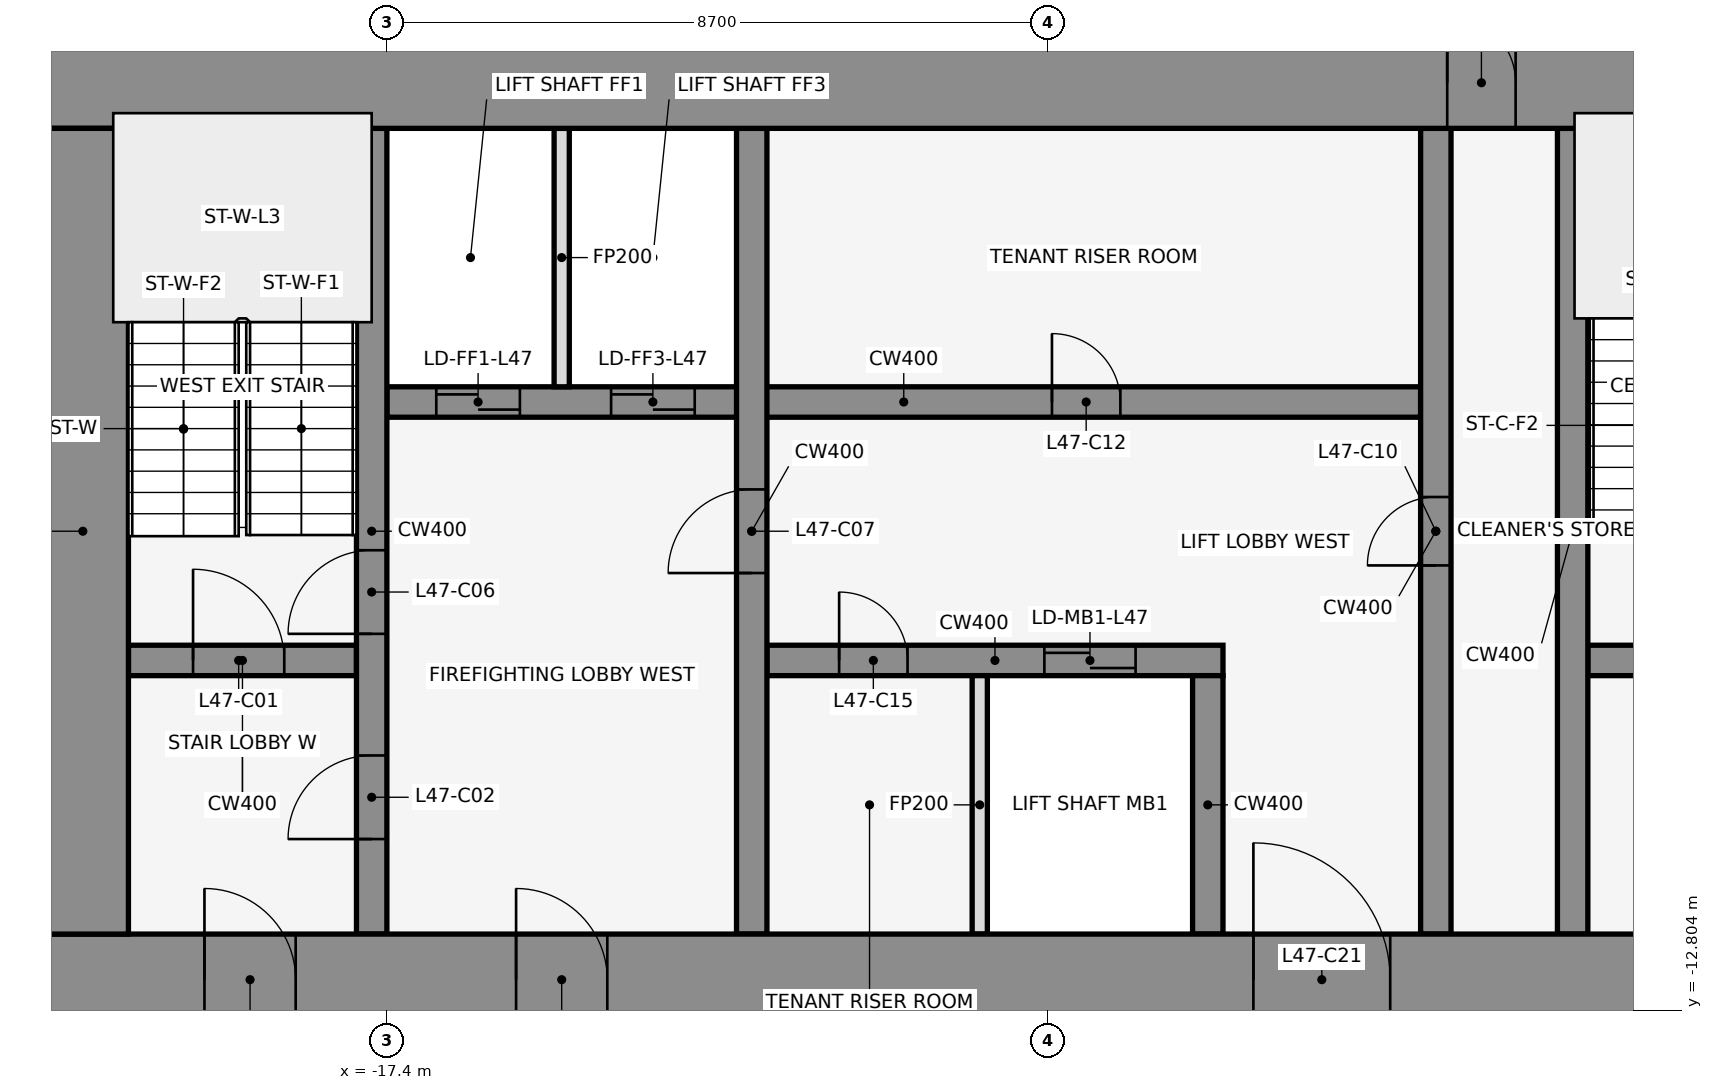
"""IFC4 building model, lengths in metres.
Left out: names, types, materials, properties, quantities, classifications, styles, units other than length and angle.
Written with IfcOpenShell. Run it as: python <this file> out.ifc"""

import sys

from ifc_helpers import new_model, si_unit, direction, frame, frame_2d, origin, place, context, subcontext, project, spatial, rectangle, extrude, element, fill, save


model = new_model("IFC4")
c1 = context("Model", 3, precision=1e-05, world=origin(), true_north=direction((0.0, 1.0)))
c2 = subcontext(c1, "Body", "Model", "MODEL_VIEW")
j1 = project(units=[si_unit("LENGTHUNIT", "METRE"), si_unit("PLANEANGLEUNIT", "RADIAN")], contexts=[c1])
p1 = place(None, origin())
s1 = spatial("IfcSite", under=j1, at=p1, CompositionType="ELEMENT")
p2 = place(p1, origin())
s2 = spatial("IfcBuilding", under=s1, at=p2, CompositionType="ELEMENT")
p3 = place(p2, frame((0.0, 0.0, 211.4)))
s3 = spatial("IfcBuildingStorey", under=s2, at=p3, CompositionType="ELEMENT", Elevation=211.4)
for number, where, z_axis, x_axis in (
    (1, (-0.068, -0.105, 0.0), (0.0, 0.0, 1.0), (-0.84, 0.543, 0.0)),
    (2, (-14.599, 1.08, 0.0), (0.0, 0.0, 1.0), (-0.84, -0.543, 0.0)),
):
    element("IfcWall", number, at=place(p3, frame(where, z_axis=z_axis, x_axis=x_axis)), inside=s3, PredefinedType="STANDARD", context=c2, shape_type="SweptSolid", body=[
        extrude(rectangle(XDim=2.183, YDim=0.25, at=frame_2d((1.091, 0.0))), origin(), (0.0, 0.0, 1.0), 3.95),
    ])
p4 = place(p3, frame((-20.8, -8.2, 0.0), z_axis=(0.0, 0.0, 1.0), x_axis=(1.0, 0.0, 0.0)))
e3 = element("IfcWall", 3, at=p4, inside=s3, PredefinedType="SHEAR", context=c2, shape_type="SweptSolid", body=[
    extrude(rectangle(XDim=3.0, YDim=0.4, at=frame_2d((1.5, 0.0))), origin(), (0.0, 0.0, 1.0), 4.1),
])
p5 = place(p4, frame((0.85, 0.0, 0.0)))
e4 = element("IfcOpeningElement", 4, at=p5, cuts=e3, PredefinedType="OPENING", context=c2, shape_type="SweptSolid", body=[
    extrude(rectangle(XDim=1.2, YDim=2.1, at=frame_2d((0.6, 1.05))), frame((0.0, 0.212, 0.0), z_axis=(0.0, -1.0, 0.0), x_axis=(1.0, 0.0, 0.0)), (0.0, 0.0, 1.0), 0.424),
])
p6 = place(p3, frame((-12.4, -8.2, 0.0), z_axis=(0.0, 0.0, 1.0), x_axis=(1.0, 0.0, 0.0)))
e5 = element("IfcWall", 5, at=p6, inside=s3, PredefinedType="SHEAR", context=c2, shape_type="SweptSolid", body=[
    extrude(rectangle(XDim=6.0, YDim=0.4, at=frame_2d((3.0, 0.0))), origin(), (0.0, 0.0, 1.0), 4.1),
])
p7 = place(p6, frame((3.65, 0.0, 0.0)))
e6 = element("IfcOpeningElement", 6, at=p7, cuts=e5, PredefinedType="OPENING", context=c2, shape_type="SweptSolid", body=[
    extrude(rectangle(XDim=1.2, YDim=2.1, at=frame_2d((0.6, 1.05))), frame((0.0, 0.212, 0.0), z_axis=(0.0, -1.0, 0.0), x_axis=(1.0, 0.0, 0.0)), (0.0, 0.0, 1.0), 0.424),
])
p8 = place(p6, frame((0.95, 0.0, 0.0)))
e7 = element("IfcOpeningElement", 7, at=p8, cuts=e5, PredefinedType="OPENING", context=c2, shape_type="SweptSolid", body=[
    extrude(rectangle(XDim=0.9, YDim=2.1, at=frame_2d((0.45, 1.05))), frame((0.0, 0.212, 0.0), z_axis=(0.0, -1.0, 0.0), x_axis=(1.0, 0.0, 0.0)), (0.0, 0.0, 1.0), 0.424),
])
p9 = place(p3, frame((-1.6, -8.2, 0.0), z_axis=(0.0, 0.0, 1.0), x_axis=(1.0, 0.0, 0.0)))
e8 = element("IfcWall", 8, at=p9, inside=s3, PredefinedType="SHEAR", context=c2, shape_type="SweptSolid", body=[
    extrude(rectangle(XDim=3.2, YDim=0.4, at=frame_2d((1.6, 0.0))), origin(), (0.0, 0.0, 1.0), 4.1),
])
p10 = place(p9, frame((1.05, 0.0, 0.0)))
e9 = element("IfcOpeningElement", 9, at=p10, cuts=e8, PredefinedType="OPENING", context=c2, shape_type="SweptSolid", body=[
    extrude(rectangle(XDim=1.2, YDim=2.1, at=frame_2d((0.6, 1.05))), frame((0.0, 0.212, 0.0), z_axis=(0.0, -1.0, 0.0), x_axis=(1.0, 0.0, 0.0)), (0.0, 0.0, 1.0), 0.424),
])
p11 = place(p3, frame((-17.4, -4.8, 0.0), z_axis=(0.0, 0.0, 1.0), x_axis=(1.0, 0.0, 0.0)))
e10 = element("IfcWall", 10, at=p11, inside=s3, PredefinedType="SHEAR", context=c2, shape_type="SweptSolid", body=[
    extrude(rectangle(XDim=13.6, YDim=0.4, at=frame_2d((6.8, 0.0))), origin(), (0.0, 0.0, 1.0), 4.1),
])
p12 = place(p11, frame((0.65, 0.0, 0.0)))
e11 = element("IfcOpeningElement", 11, at=p12, cuts=e10, PredefinedType="OPENING", context=c2, shape_type="SweptSolid", body=[
    extrude(rectangle(XDim=1.1, YDim=2.1, at=frame_2d((0.55, 1.05))), frame((0.0, 0.212, 0.0), z_axis=(0.0, -1.0, 0.0), x_axis=(1.0, 0.0, 0.0)), (0.0, 0.0, 1.0), 0.424),
])
p13 = place(p11, frame((2.95, 0.0, 0.0)))
e12 = element("IfcOpeningElement", 12, at=p13, cuts=e10, PredefinedType="OPENING", context=c2, shape_type="SweptSolid", body=[
    extrude(rectangle(XDim=1.1, YDim=2.1, at=frame_2d((0.55, 1.05))), frame((0.0, 0.212, 0.0), z_axis=(0.0, -1.0, 0.0), x_axis=(1.0, 0.0, 0.0)), (0.0, 0.0, 1.0), 0.424),
])
p14 = place(p11, frame((8.75, 0.0, 0.0)))
e13 = element("IfcOpeningElement", 13, at=p14, cuts=e10, PredefinedType="OPENING", context=c2, shape_type="SweptSolid", body=[
    extrude(rectangle(XDim=0.9, YDim=2.1, at=frame_2d((0.45, 1.05))), frame((0.0, 0.212, 0.0), z_axis=(0.0, -1.0, 0.0), x_axis=(1.0, 0.0, 0.0)), (0.0, 0.0, 1.0), 0.424),
])
p15 = place(p3, frame((-17.6, -11.8, 0.0), z_axis=(0.0, 0.0, 1.0), x_axis=(0.0, 1.0, 0.0)))
e14 = element("IfcWall", 14, at=p15, inside=s3, PredefinedType="SHEAR", context=c2, shape_type="SweptSolid", body=[
    extrude(rectangle(XDim=10.6, YDim=0.4, at=frame_2d((5.3, 0.0))), origin(), (0.0, 0.0, 1.0), 4.1),
])
p16 = place(p15, frame((1.25, 0.0, 0.0)))
e15 = element("IfcOpeningElement", 15, at=p16, cuts=e14, PredefinedType="OPENING", context=c2, shape_type="SweptSolid", body=[
    extrude(rectangle(XDim=1.1, YDim=2.1, at=frame_2d((0.55, 1.05))), frame((0.0, 0.212, 0.0), z_axis=(0.0, -1.0, 0.0), x_axis=(1.0, 0.0, 0.0)), (0.0, 0.0, 1.0), 0.424),
])
p17 = place(p15, frame((3.95, 0.0, 0.0)))
e16 = element("IfcOpeningElement", 16, at=p17, cuts=e14, PredefinedType="OPENING", context=c2, shape_type="SweptSolid", body=[
    extrude(rectangle(XDim=1.1, YDim=2.1, at=frame_2d((0.55, 1.05))), frame((0.0, 0.212, 0.0), z_axis=(0.0, -1.0, 0.0), x_axis=(1.0, 0.0, 0.0)), (0.0, 0.0, 1.0), 0.424),
])
p18 = place(p3, frame((-15.1, -4.6, 0.0), z_axis=(0.0, 0.0, 1.0), x_axis=(0.0, 1.0, 0.0)))
e17 = element("IfcWall", 17, at=p18, inside=s3, PredefinedType="PARTITIONING", context=c2, shape_type="SweptSolid", body=[
    extrude(rectangle(XDim=3.4, YDim=0.2, at=frame_2d((1.7, 0.0))), origin(), (0.0, 0.0, 1.0), 2.841),
])
p19 = place(p3, frame((-12.6, -11.8, 0.0), z_axis=(0.0, 0.0, 1.0), x_axis=(0.0, 1.0, 0.0)))
e18 = element("IfcWall", 18, at=p19, inside=s3, PredefinedType="SHEAR", context=c2, shape_type="SweptSolid", body=[
    extrude(rectangle(XDim=10.6, YDim=0.4, at=frame_2d((5.3, 0.0))), origin(), (0.0, 0.0, 1.0), 4.1),
])
p20 = place(p19, frame((4.75, 0.0, 0.0)))
e19 = element("IfcOpeningElement", 19, at=p20, cuts=e18, PredefinedType="OPENING", context=c2, shape_type="SweptSolid", body=[
    extrude(rectangle(XDim=1.1, YDim=2.1, at=frame_2d((0.55, 1.05))), frame((0.0, 0.212, 0.0), z_axis=(0.0, -1.0, 0.0), x_axis=(1.0, 0.0, 0.0)), (0.0, 0.0, 1.0), 0.424),
])
p21 = place(p3, frame((-9.6, -11.8, 0.0), z_axis=(0.0, 0.0, 1.0), x_axis=(0.0, 1.0, 0.0)))
e20 = element("IfcWall", 20, at=p21, inside=s3, PredefinedType="PARTITIONING", context=c2, shape_type="SweptSolid", body=[
    extrude(rectangle(XDim=3.4, YDim=0.2, at=frame_2d((1.7, 0.0))), origin(), (0.0, 0.0, 1.0), 2.841),
])
p22 = place(p3, frame((-6.6, -11.8, 0.0), z_axis=(0.0, 0.0, 1.0), x_axis=(0.0, 1.0, 0.0)))
e21 = element("IfcWall", 21, at=p22, inside=s3, PredefinedType="SHEAR", context=c2, shape_type="SweptSolid", body=[
    extrude(rectangle(XDim=3.4, YDim=0.4, at=frame_2d((1.7, 0.0))), origin(), (0.0, 0.0, 1.0), 4.1),
])
p23 = place(p3, frame((-3.6, -11.8, 0.0), z_axis=(0.0, 0.0, 1.0), x_axis=(0.0, 1.0, 0.0)))
e22 = element("IfcWall", 22, at=p23, inside=s3, PredefinedType="SHEAR", context=c2, shape_type="SweptSolid", body=[
    extrude(rectangle(XDim=10.6, YDim=0.4, at=frame_2d((5.3, 0.0))), origin(), (0.0, 0.0, 1.0), 4.1),
])
p24 = place(p23, frame((4.85, 0.0, 0.0)))
e23 = element("IfcOpeningElement", 23, at=p24, cuts=e22, PredefinedType="OPENING", context=c2, shape_type="SweptSolid", body=[
    extrude(rectangle(XDim=0.9, YDim=2.1, at=frame_2d((0.45, 1.05))), frame((0.0, 0.212, 0.0), z_axis=(0.0, -1.0, 0.0), x_axis=(1.0, 0.0, 0.0)), (0.0, 0.0, 1.0), 0.424),
])
p25 = place(p3, frame((-1.8, -11.8, 0.0), z_axis=(0.0, 0.0, 1.0), x_axis=(0.0, 1.0, 0.0)))
e24 = element("IfcWall", 24, at=p25, inside=s3, PredefinedType="SHEAR", context=c2, shape_type="SweptSolid", body=[
    extrude(rectangle(XDim=10.6, YDim=0.4, at=frame_2d((5.3, 0.0))), origin(), (0.0, 0.0, 1.0), 4.1),
])
p26 = place(p3, frame((-22.0, -0.6, 0.0), z_axis=(0.0, 0.0, 1.0), x_axis=(1.0, 0.0, 0.0)))
e25 = element("IfcWall", 25, at=p26, inside=s3, PredefinedType="SHEAR", context=c2, shape_type="SweptSolid", body=[
    extrude(rectangle(XDim=44.0, YDim=1.2, at=frame_2d((22.0, 0.0))), origin(), (0.0, 0.0, 1.0), 4.1),
])
p27 = place(p26, frame((18.55, 0.0, 0.0)))
e26 = element("IfcOpeningElement", 26, at=p27, cuts=e25, PredefinedType="OPENING", context=c2, shape_type="SweptSolid", body=[
    extrude(rectangle(XDim=0.9, YDim=2.1, at=frame_2d((0.45, 1.05))), frame((0.0, 0.612, 0.0), z_axis=(0.0, -1.0, 0.0), x_axis=(1.0, 0.0, 0.0)), (0.0, 0.0, 1.0), 1.224),
])
p28 = place(p26, frame((24.55, 0.0, 0.0)))
e27 = element("IfcOpeningElement", 27, at=p28, cuts=e25, PredefinedType="OPENING", context=c2, shape_type="SweptSolid", body=[
    extrude(rectangle(XDim=0.9, YDim=2.1, at=frame_2d((0.45, 1.05))), frame((0.0, 0.612, 0.0), z_axis=(0.0, -1.0, 0.0), x_axis=(1.0, 0.0, 0.0)), (0.0, 0.0, 1.0), 1.224),
])
p29 = place(p3, frame((-22.0, -12.4, 0.0), z_axis=(0.0, 0.0, 1.0), x_axis=(1.0, 0.0, 0.0)))
e28 = element("IfcWall", 28, at=p29, inside=s3, PredefinedType="SHEAR", context=c2, shape_type="SweptSolid", body=[
    extrude(rectangle(XDim=44.0, YDim=1.2, at=frame_2d((22.0, 0.0))), origin(), (0.0, 0.0, 1.0), 4.1),
])
p30 = place(p29, frame((2.2, 0.0, 0.0)))
e29 = element("IfcOpeningElement", 29, at=p30, cuts=e28, PredefinedType="OPENING", context=c2, shape_type="SweptSolid", body=[
    extrude(rectangle(XDim=1.2, YDim=2.1, at=frame_2d((0.6, 1.05))), frame((0.0, 0.612, 0.0), z_axis=(0.0, -1.0, 0.0), x_axis=(1.0, 0.0, 0.0)), (0.0, 0.0, 1.0), 1.224),
])
p31 = place(p29, frame((21.4, 0.0, 0.0)))
e30 = element("IfcOpeningElement", 30, at=p31, cuts=e28, PredefinedType="OPENING", context=c2, shape_type="SweptSolid", body=[
    extrude(rectangle(XDim=1.2, YDim=2.1, at=frame_2d((0.6, 1.05))), frame((0.0, 0.612, 0.0), z_axis=(0.0, -1.0, 0.0), x_axis=(1.0, 0.0, 0.0)), (0.0, 0.0, 1.0), 1.224),
])
p32 = place(p29, frame((40.6, 0.0, 0.0)))
e31 = element("IfcOpeningElement", 31, at=p32, cuts=e28, PredefinedType="OPENING", context=c2, shape_type="SweptSolid", body=[
    extrude(rectangle(XDim=1.2, YDim=2.1, at=frame_2d((0.6, 1.05))), frame((0.0, 0.612, 0.0), z_axis=(0.0, -1.0, 0.0), x_axis=(1.0, 0.0, 0.0)), (0.0, 0.0, 1.0), 1.224),
])
p33 = place(p29, frame((16.0, 0.0, 0.0)))
e32 = element("IfcOpeningElement", 32, at=p33, cuts=e28, PredefinedType="OPENING", context=c2, shape_type="SweptSolid", body=[
    extrude(rectangle(XDim=1.8, YDim=2.1, at=frame_2d((0.9, 1.05))), frame((0.0, 0.612, 0.0), z_axis=(0.0, -1.0, 0.0), x_axis=(1.0, 0.0, 0.0)), (0.0, 0.0, 1.0), 1.224),
])
p34 = place(p29, frame((6.3, 0.0, 0.0)))
e33 = element("IfcOpeningElement", 33, at=p34, cuts=e28, PredefinedType="OPENING", context=c2, shape_type="SweptSolid", body=[
    extrude(rectangle(XDim=1.2, YDim=2.1, at=frame_2d((0.6, 1.05))), frame((0.0, 0.612, 0.0), z_axis=(0.0, -1.0, 0.0), x_axis=(1.0, 0.0, 0.0)), (0.0, 0.0, 1.0), 1.224),
])
p35 = place(p29, frame((26.2, 0.0, 0.0)))
e34 = element("IfcOpeningElement", 34, at=p35, cuts=e28, PredefinedType="OPENING", context=c2, shape_type="SweptSolid", body=[
    extrude(rectangle(XDim=1.8, YDim=2.1, at=frame_2d((0.9, 1.05))), frame((0.0, 0.612, 0.0), z_axis=(0.0, -1.0, 0.0), x_axis=(1.0, 0.0, 0.0)), (0.0, 0.0, 1.0), 1.224),
])
p36 = place(p29, frame((36.5, 0.0, 0.0)))
e35 = element("IfcOpeningElement", 35, at=p36, cuts=e28, PredefinedType="OPENING", context=c2, shape_type="SweptSolid", body=[
    extrude(rectangle(XDim=1.2, YDim=2.1, at=frame_2d((0.6, 1.05))), frame((0.0, 0.612, 0.0), z_axis=(0.0, -1.0, 0.0), x_axis=(1.0, 0.0, 0.0)), (0.0, 0.0, 1.0), 1.224),
])
p37 = place(p3, frame((-21.4, -11.8, 0.0), z_axis=(0.0, 0.0, 1.0), x_axis=(0.0, 1.0, 0.0)))
e36 = element("IfcWall", 36, at=p37, inside=s3, PredefinedType="SHEAR", context=c2, shape_type="SweptSolid", body=[
    extrude(rectangle(XDim=10.6, YDim=1.2, at=frame_2d((5.3, 0.0))), origin(), (0.0, 0.0, 1.0), 4.1),
])
p38 = place(p5, origin())
e37 = element("IfcDoor", 37, at=p38, inside=s3, OperationType="SINGLE_SWING_LEFT", PredefinedType="DOOR", context=c2, shape_type="SweptSolid", body=[
    extrude(rectangle(XDim=1.2, YDim=2.1, at=frame_2d((0.6, 1.05))), frame((0.0, 0.025, 0.0), z_axis=(0.0, -1.0, 0.0), x_axis=(1.0, 0.0, 0.0)), (0.0, 0.0, 1.0), 0.05),
])
fill(e4, e37)
p39 = place(p16, frame((1.1, 0.0, 0.0), z_axis=(0.0, 0.0, 1.0), x_axis=(-1.0, 0.0, 0.0)))
e38 = element("IfcDoor", 38, at=p39, inside=s3, OperationType="SINGLE_SWING_LEFT", PredefinedType="DOOR", context=c2, shape_type="SweptSolid", body=[
    extrude(rectangle(XDim=1.1, YDim=2.1, at=frame_2d((0.55, 1.05))), frame((0.0, 0.025, 0.0), z_axis=(0.0, -1.0, 0.0), x_axis=(1.0, 0.0, 0.0)), (0.0, 0.0, 1.0), 0.05),
])
fill(e15, e38)
p40 = place(p12, origin())
e39 = element("IfcDoor", 39, at=p40, inside=s3, OperationType="DOUBLE_DOOR_SLIDING", PredefinedType="DOOR", context=c2, shape_type="SweptSolid", body=[
    extrude(rectangle(XDim=1.1, YDim=2.1, at=frame_2d((0.55, 1.05))), frame((0.0, 0.025, 0.0), z_axis=(0.0, -1.0, 0.0), x_axis=(1.0, 0.0, 0.0)), (0.0, 0.0, 1.0), 0.05),
])
fill(e11, e39)
p41 = place(p13, origin())
e40 = element("IfcDoor", 40, at=p41, inside=s3, OperationType="DOUBLE_DOOR_SLIDING", PredefinedType="DOOR", context=c2, shape_type="SweptSolid", body=[
    extrude(rectangle(XDim=1.1, YDim=2.1, at=frame_2d((0.55, 1.05))), frame((0.0, 0.025, 0.0), z_axis=(0.0, -1.0, 0.0), x_axis=(1.0, 0.0, 0.0)), (0.0, 0.0, 1.0), 0.05),
])
fill(e12, e40)
p42 = place(p7, origin())
e41 = element("IfcDoor", 41, at=p42, inside=s3, OperationType="DOUBLE_DOOR_SLIDING", PredefinedType="DOOR", context=c2, shape_type="SweptSolid", body=[
    extrude(rectangle(XDim=1.2, YDim=2.1, at=frame_2d((0.6, 1.05))), frame((0.0, 0.025, 0.0), z_axis=(0.0, -1.0, 0.0), x_axis=(1.0, 0.0, 0.0)), (0.0, 0.0, 1.0), 0.05),
])
fill(e6, e41)
p43 = place(p17, frame((1.1, 0.0, 0.0), z_axis=(0.0, 0.0, 1.0), x_axis=(-1.0, 0.0, 0.0)))
e42 = element("IfcDoor", 42, at=p43, inside=s3, OperationType="SINGLE_SWING_LEFT", PredefinedType="DOOR", context=c2, shape_type="SweptSolid", body=[
    extrude(rectangle(XDim=1.1, YDim=2.1, at=frame_2d((0.55, 1.05))), frame((0.0, 0.025, 0.0), z_axis=(0.0, -1.0, 0.0), x_axis=(1.0, 0.0, 0.0)), (0.0, 0.0, 1.0), 0.05),
])
fill(e16, e42)
p44 = place(p20, origin())
e43 = element("IfcDoor", 43, at=p44, inside=s3, OperationType="SINGLE_SWING_LEFT", PredefinedType="DOOR", context=c2, shape_type="SweptSolid", body=[
    extrude(rectangle(XDim=1.1, YDim=2.1, at=frame_2d((0.55, 1.05))), frame((0.0, 0.025, 0.0), z_axis=(0.0, -1.0, 0.0), x_axis=(1.0, 0.0, 0.0)), (0.0, 0.0, 1.0), 0.05),
])
fill(e19, e43)
p45 = place(p24, frame((0.9, 0.0, 0.0), z_axis=(0.0, 0.0, 1.0), x_axis=(-1.0, 0.0, 0.0)))
e44 = element("IfcDoor", 44, at=p45, inside=s3, OperationType="SINGLE_SWING_LEFT", PredefinedType="DOOR", context=c2, shape_type="SweptSolid", body=[
    extrude(rectangle(XDim=0.9, YDim=2.1, at=frame_2d((0.45, 1.05))), frame((0.0, 0.025, 0.0), z_axis=(0.0, -1.0, 0.0), x_axis=(1.0, 0.0, 0.0)), (0.0, 0.0, 1.0), 0.05),
])
fill(e23, e44)
p46 = place(p14, origin())
e45 = element("IfcDoor", 45, at=p46, inside=s3, OperationType="SINGLE_SWING_RIGHT", PredefinedType="DOOR", context=c2, shape_type="SweptSolid", body=[
    extrude(rectangle(XDim=0.9, YDim=2.1, at=frame_2d((0.45, 1.05))), frame((0.0, 0.025, 0.0), z_axis=(0.0, -1.0, 0.0), x_axis=(1.0, 0.0, 0.0)), (0.0, 0.0, 1.0), 0.05),
])
fill(e13, e45)
p47 = place(p8, frame((0.9, 0.0, 0.0), z_axis=(0.0, 0.0, 1.0), x_axis=(-1.0, 0.0, 0.0)))
e46 = element("IfcDoor", 46, at=p47, inside=s3, OperationType="SINGLE_SWING_RIGHT", PredefinedType="DOOR", context=c2, shape_type="SweptSolid", body=[
    extrude(rectangle(XDim=0.9, YDim=2.1, at=frame_2d((0.45, 1.05))), frame((0.0, 0.025, 0.0), z_axis=(0.0, -1.0, 0.0), x_axis=(1.0, 0.0, 0.0)), (0.0, 0.0, 1.0), 0.05),
])
fill(e7, e46)
p48 = place(p27, origin())
e47 = element("IfcDoor", 47, at=p48, inside=s3, OperationType="SINGLE_SWING_LEFT", PredefinedType="DOOR", context=c2, shape_type="SweptSolid", body=[
    extrude(rectangle(XDim=0.9, YDim=2.1, at=frame_2d((0.45, 1.05))), frame((0.0, 0.025, 0.0), z_axis=(0.0, -1.0, 0.0), x_axis=(1.0, 0.0, 0.0)), (0.0, 0.0, 1.0), 0.05),
])
fill(e26, e47)
p49 = place(p30, frame((1.2, 0.0, 0.0), z_axis=(0.0, 0.0, 1.0), x_axis=(-1.0, 0.0, 0.0)))
e48 = element("IfcDoor", 48, at=p49, inside=s3, OperationType="SINGLE_SWING_RIGHT", PredefinedType="DOOR", context=c2, shape_type="SweptSolid", body=[
    extrude(rectangle(XDim=1.2, YDim=2.1, at=frame_2d((0.6, 1.05))), frame((0.0, 0.025, 0.0), z_axis=(0.0, -1.0, 0.0), x_axis=(1.0, 0.0, 0.0)), (0.0, 0.0, 1.0), 0.05),
])
fill(e29, e48)
p50 = place(p33, origin())
e49 = element("IfcDoor", 49, at=p50, inside=s3, OperationType="SINGLE_SWING_LEFT", PredefinedType="DOOR", context=c2, shape_type="SweptSolid", body=[
    extrude(rectangle(XDim=1.8, YDim=2.1, at=frame_2d((0.9, 1.05))), frame((0.0, 0.025, 0.0), z_axis=(0.0, -1.0, 0.0), x_axis=(1.0, 0.0, 0.0)), (0.0, 0.0, 1.0), 0.05),
])
fill(e32, e49)
p51 = place(p34, frame((1.2, 0.0, 0.0), z_axis=(0.0, 0.0, 1.0), x_axis=(-1.0, 0.0, 0.0)))
e50 = element("IfcDoor", 50, at=p51, inside=s3, OperationType="SINGLE_SWING_RIGHT", PredefinedType="DOOR", context=c2, shape_type="SweptSolid", body=[
    extrude(rectangle(XDim=1.2, YDim=2.1, at=frame_2d((0.6, 1.05))), frame((0.0, 0.025, 0.0), z_axis=(0.0, -1.0, 0.0), x_axis=(1.0, 0.0, 0.0)), (0.0, 0.0, 1.0), 0.05),
])
fill(e33, e50)
save(model, sys.argv[1])
